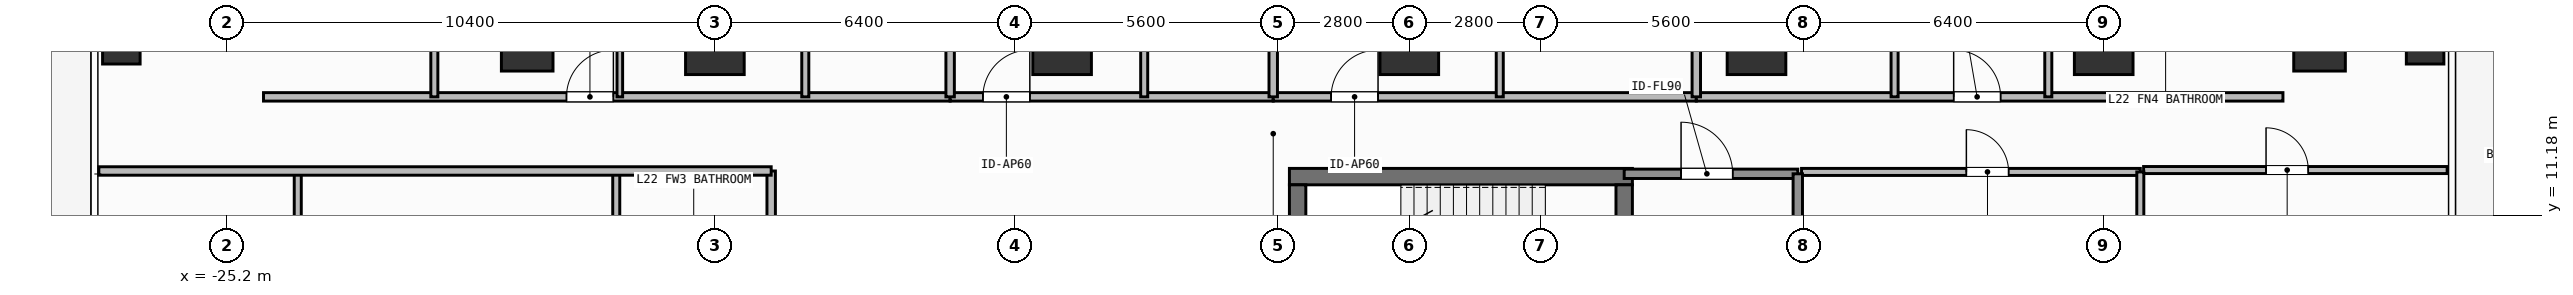
"""IFC4 building model, lengths in metres.
Left out: names, types, materials, properties, quantities, classifications, styles, units other than length and angle.
Written with IfcOpenShell. Run it as: python <this file> out.ifc"""

import sys

from ifc_helpers import new_model, si_unit, direction, frame, frame_2d, origin, origin_2d, place, context, subcontext, project, spatial, rectangle, hollow_rectangle, extrude, element, fill, save


model = new_model("IFC4")
c1 = context("Model", 3, precision=1e-05, world=origin(), true_north=direction((0.0, 1.0)))
c2 = subcontext(c1, "Body", "Model", "MODEL_VIEW")
j1 = project(units=[si_unit("LENGTHUNIT", "METRE"), si_unit("PLANEANGLEUNIT", "RADIAN")], contexts=[c1])
p1 = place(None, origin())
s1 = spatial("IfcSite", under=j1, at=p1, CompositionType="ELEMENT")
p2 = place(p1, origin())
s2 = spatial("IfcBuilding", under=s1, at=p2, CompositionType="ELEMENT")
p3 = place(p2, frame((0.0, 0.0, 89.1)))
s3 = spatial("IfcBuildingStorey", under=s2, at=p3, CompositionType="ELEMENT", Elevation=89.1)
p4 = place(p3, frame((-2.555, 12.0, 0.0), z_axis=(0.0, 0.0, 1.0), x_axis=(1.0, 0.0, 0.0)))
e1 = element("IfcWall", 1, at=p4, inside=s3, PredefinedType="SHEAR", context=c2, shape_type="SweptSolid", body=[
    extrude(rectangle(XDim=7.31, YDim=0.35, at=frame_2d((3.655, 0.0))), origin(), (0.0, 0.0, 1.0), 3.9),
])
p5 = place(p3, frame((-2.38, 8.9, 0.0), z_axis=(0.0, 0.0, 1.0), x_axis=(0.0, 1.0, 0.0)))
e2 = element("IfcWall", 2, at=p5, inside=s3, PredefinedType="SHEAR", context=c2, shape_type="SweptSolid", body=[
    extrude(rectangle(XDim=2.925, YDim=0.35, at=frame_2d((1.462, 0.0))), origin(), (0.0, 0.0, 1.0), 3.9),
])
p6 = place(p3, frame((4.58, 11.825, 0.0), z_axis=(0.0, 0.0, 1.0), x_axis=(0.0, -1.0, 0.0)))
e3 = element("IfcWall", 3, at=p6, inside=s3, PredefinedType="SHEAR", context=c2, shape_type="SweptSolid", body=[
    extrude(rectangle(XDim=2.925, YDim=0.35, at=frame_2d((1.462, 0.0))), origin(), (0.0, 0.0, 1.0), 3.9),
])
p7 = place(p6, frame((0.913, 0.0, 0.0)))
e4 = element("IfcOpeningElement", 4, at=p7, cuts=e3, PredefinedType="OPENING", context=c2, shape_type="SweptSolid", body=[
    extrude(rectangle(XDim=1.1, YDim=2.15, at=frame_2d((0.55, 1.075))), frame((0.0, 0.185, 0.0), z_axis=(0.0, -1.0, 0.0), x_axis=(1.0, 0.0, 0.0)), (0.0, 0.0, 1.0), 0.37),
])
for number, where, z_axis, x_axis in (
    (5, (-14.8, 14.8, 0.0), (0.0, 0.0, 1.0), (1.0, 0.0, 0.0)),
    (6, (-7.4, 14.8, 0.0), (0.0, 0.0, 1.0), (1.0, 0.0, 0.0)),
    (7, (0.0, 14.8, 0.0), (0.0, 0.0, 1.0), (1.0, 0.0, 0.0)),
    (8, (7.4, 14.8, 0.0), (0.0, 0.0, 1.0), (1.0, 0.0, 0.0)),
    (9, (14.8, 14.8, 0.0), (0.0, 0.0, 1.0), (1.0, 0.0, 0.0)),
):
    element("IfcColumn", number, at=place(p3, frame(where, z_axis=z_axis, x_axis=x_axis)), inside=s3, PredefinedType="COLUMN", context=c2, shape_type="SweptSolid", body=[
        extrude(rectangle(XDim=1.25, YDim=1.25, at=origin_2d()), origin(), (0.0, 0.0, 1.0), 3.9),
    ])
for number, where, z_axis, x_axis in (
    (10, (-18.8, 14.8, 0.0), (0.0, 0.0, 1.0), (1.0, 0.0, 0.0)),
    (11, (19.4, 14.8, 0.0), (0.0, 0.0, 1.0), (1.0, 0.0, 0.0)),
):
    element("IfcColumn", number, at=place(p3, frame(where, z_axis=z_axis, x_axis=x_axis)), inside=s3, PredefinedType="COLUMN", context=c2, shape_type="SweptSolid", body=[
        extrude(rectangle(XDim=1.1, YDim=1.1, at=origin_2d()), origin(), (0.0, 0.0, 1.0), 3.9),
    ])
for number, where, z_axis, x_axis in (
    (12, (-27.45, 14.8, 0.0), (0.0, 0.0, 1.0), (1.0, 0.0, 0.0)),
    (13, (21.65, 14.8, 0.0), (0.0, 0.0, 1.0), (1.0, 0.0, 0.0)),
):
    element("IfcColumn", number, at=place(p3, frame(where, z_axis=z_axis, x_axis=x_axis)), inside=s3, PredefinedType="COLUMN", context=c2, shape_type="SweptSolid", body=[
        extrude(hollow_rectangle(XDim=0.8, YDim=0.8, WallThickness=0.036, at=origin_2d()), origin(), (0.0, 0.0, 1.0), 3.9),
    ])
p8 = place(p3, frame((4.58, 12.06, 0.0), z_axis=(0.0, 0.0, 1.0), x_axis=(1.0, 0.0, 0.0)))
e14 = element("IfcWall", 14, at=p8, inside=s3, PredefinedType="SOLIDWALL", context=c2, shape_type="SweptSolid", body=[
    extrude(rectangle(XDim=3.7, YDim=0.2, at=frame_2d((1.85, 0.0))), origin(), (0.0, 0.0, 1.0), 3.68),
])
p9 = place(p8, frame((1.212, 0.0, 0.0)))
e15 = element("IfcOpeningElement", 15, at=p9, cuts=e14, PredefinedType="OPENING", context=c2, shape_type="SweptSolid", body=[
    extrude(rectangle(XDim=1.1, YDim=2.15, at=frame_2d((0.55, 1.075))), frame((0.0, 0.11, 0.0), z_axis=(0.0, -1.0, 0.0), x_axis=(1.0, 0.0, 0.0)), (0.0, 0.0, 1.0), 0.22),
])
p10 = place(p3, frame((8.36, 12.1, 0.0), z_axis=(0.0, 0.0, 1.0), x_axis=(1.0, 0.0, 0.0)))
e16 = element("IfcWall", 16, at=p10, inside=s3, PredefinedType="PARTITIONING", context=c2, shape_type="SweptSolid", body=[
    extrude(rectangle(XDim=7.22, YDim=0.15, at=frame_2d((3.61, 0.0))), origin(), (0.0, 0.0, 1.0), 3.68),
])
p11 = place(p10, frame((3.513, 0.0, 0.0)))
e17 = element("IfcOpeningElement", 17, at=p11, cuts=e16, PredefinedType="OPENING", context=c2, shape_type="SweptSolid", body=[
    extrude(rectangle(XDim=0.9, YDim=2.1, at=frame_2d((0.45, 1.05))), frame((0.0, 0.085, 0.0), z_axis=(0.0, -1.0, 0.0), x_axis=(1.0, 0.0, 0.0)), (0.0, 0.0, 1.0), 0.17),
])
p12 = place(p3, frame((-24.42, 13.7, 0.0), z_axis=(0.0, 0.0, 1.0), x_axis=(1.0, 0.0, 0.0)))
e18 = element("IfcWall", 18, at=p12, inside=s3, PredefinedType="PARTITIONING", context=c2, shape_type="SweptSolid", body=[
    extrude(rectangle(XDim=14.634, YDim=0.18, at=frame_2d((7.317, 0.0))), origin(), (0.0, 0.0, 1.0), 3.68),
])
p13 = place(p12, frame((6.457, 0.0, 0.0)))
e19 = element("IfcOpeningElement", 19, at=p13, cuts=e18, PredefinedType="OPENING", context=c2, shape_type="SweptSolid", body=[
    extrude(rectangle(XDim=1.0, YDim=2.2, at=frame_2d((0.5, 1.1))), frame((0.0, 0.1, 0.0), z_axis=(0.0, -1.0, 0.0), x_axis=(1.0, 0.0, 0.0)), (0.0, 0.0, 1.0), 0.2),
])
p14 = place(p3, frame((-16.826, 13.7, 0.0), z_axis=(0.0, 0.0, 1.0), x_axis=(0.0, 1.0, 0.0)))
e20 = element("IfcWall", 20, at=p14, inside=s3, PredefinedType="PARTITIONING", context=c2, shape_type="SweptSolid", body=[
    extrude(rectangle(XDim=12.89, YDim=0.12, at=frame_2d((6.445, 0.0))), origin(), (0.0, 0.0, 1.0), 3.68),
])
p15 = place(p14, frame((5.008, 0.0, 0.0)))
e21 = element("IfcOpeningElement", 21, at=p15, cuts=e20, PredefinedType="OPENING", context=c2, shape_type="SweptSolid", body=[
    extrude(rectangle(XDim=0.9, YDim=2.1, at=frame_2d((0.45, 1.05))), frame((0.0, 0.07, 0.0), z_axis=(0.0, -1.0, 0.0), x_axis=(1.0, 0.0, 0.0)), (0.0, 0.0, 1.0), 0.14),
])
p16 = place(p3, frame((-20.779, 13.7, 0.0), z_axis=(0.0, 0.0, 1.0), x_axis=(0.0, 1.0, 0.0)))
e22 = element("IfcWall", 22, at=p16, inside=s3, PredefinedType="PARTITIONING", context=c2, shape_type="SweptSolid", body=[
    extrude(rectangle(XDim=7.476, YDim=0.15, at=frame_2d((3.738, 0.0))), origin(), (0.0, 0.0, 1.0), 3.68),
])
p17 = place(p16, frame((3.313, 0.0, 0.0)))
e23 = element("IfcOpeningElement", 23, at=p17, cuts=e22, PredefinedType="OPENING", context=c2, shape_type="SweptSolid", body=[
    extrude(rectangle(XDim=0.85, YDim=2.1, at=frame_2d((0.425, 1.05))), frame((0.0, 0.085, 0.0), z_axis=(0.0, -1.0, 0.0), x_axis=(1.0, 0.0, 0.0)), (0.0, 0.0, 1.0), 0.17),
])
p18 = place(p3, frame((-12.873, 13.7, 0.0), z_axis=(0.0, 0.0, 1.0), x_axis=(0.0, 1.0, 0.0)))
e24 = element("IfcWall", 24, at=p18, inside=s3, PredefinedType="PARTITIONING", context=c2, shape_type="SweptSolid", body=[
    extrude(rectangle(XDim=9.023, YDim=0.15, at=frame_2d((4.511, 0.0))), origin(), (0.0, 0.0, 1.0), 3.68),
])
p19 = place(p18, frame((4.086, 0.0, 0.0)))
e25 = element("IfcOpeningElement", 25, at=p19, cuts=e24, PredefinedType="OPENING", context=c2, shape_type="SweptSolid", body=[
    extrude(rectangle(XDim=0.85, YDim=2.1, at=frame_2d((0.425, 1.05))), frame((0.0, 0.085, 0.0), z_axis=(0.0, -1.0, 0.0), x_axis=(1.0, 0.0, 0.0)), (0.0, 0.0, 1.0), 0.17),
])
p20 = place(p3, frame((-9.786, 13.7, 0.0), z_axis=(0.0, 0.0, 1.0), x_axis=(1.0, 0.0, 0.0)))
e26 = element("IfcWall", 26, at=p20, inside=s3, PredefinedType="PARTITIONING", context=c2, shape_type="SweptSolid", body=[
    extrude(rectangle(XDim=6.886, YDim=0.18, at=frame_2d((3.443, 0.0))), origin(), (0.0, 0.0, 1.0), 3.68),
])
p21 = place(p20, frame((0.698, 0.0, 0.0)))
e27 = element("IfcOpeningElement", 27, at=p21, cuts=e26, PredefinedType="OPENING", context=c2, shape_type="SweptSolid", body=[
    extrude(rectangle(XDim=1.0, YDim=2.2, at=frame_2d((0.5, 1.1))), frame((0.0, 0.1, 0.0), z_axis=(0.0, -1.0, 0.0), x_axis=(1.0, 0.0, 0.0)), (0.0, 0.0, 1.0), 0.2),
])
p22 = place(p3, frame((-5.65, 13.7, 0.0), z_axis=(0.0, 0.0, 1.0), x_axis=(0.0, 1.0, 0.0)))
e28 = element("IfcWall", 28, at=p22, inside=s3, PredefinedType="PARTITIONING", context=c2, shape_type="SweptSolid", body=[
    extrude(rectangle(XDim=7.09, YDim=0.15, at=frame_2d((3.545, 0.0))), origin(), (0.0, 0.0, 1.0), 3.68),
])
p23 = place(p22, frame((3.03, 0.0, 0.0)))
e29 = element("IfcOpeningElement", 29, at=p23, cuts=e28, PredefinedType="OPENING", context=c2, shape_type="SweptSolid", body=[
    extrude(rectangle(XDim=0.85, YDim=2.1, at=frame_2d((0.425, 1.05))), frame((0.0, 0.085, 0.0), z_axis=(0.0, -1.0, 0.0), x_axis=(1.0, 0.0, 0.0)), (0.0, 0.0, 1.0), 0.17),
])
p24 = place(p3, frame((-2.9, 13.7, 0.0), z_axis=(0.0, 0.0, 1.0), x_axis=(1.0, 0.0, 0.0)))
e30 = element("IfcWall", 30, at=p24, inside=s3, PredefinedType="PARTITIONING", context=c2, shape_type="SweptSolid", body=[
    extrude(rectangle(XDim=9.017, YDim=0.18, at=frame_2d((4.508, 0.0))), origin(), (0.0, 0.0, 1.0), 3.68),
])
p25 = place(p24, frame((1.234, 0.0, 0.0)))
e31 = element("IfcOpeningElement", 31, at=p25, cuts=e30, PredefinedType="OPENING", context=c2, shape_type="SweptSolid", body=[
    extrude(rectangle(XDim=1.0, YDim=2.2, at=frame_2d((0.5, 1.1))), frame((0.0, 0.1, 0.0), z_axis=(0.0, -1.0, 0.0), x_axis=(1.0, 0.0, 0.0)), (0.0, 0.0, 1.0), 0.2),
])
p26 = place(p3, frame((1.928, 13.7, 0.0), z_axis=(0.0, 0.0, 1.0), x_axis=(0.0, 1.0, 0.0)))
e32 = element("IfcWall", 32, at=p26, inside=s3, PredefinedType="PARTITIONING", context=c2, shape_type="SweptSolid", body=[
    extrude(rectangle(XDim=8.474, YDim=0.15, at=frame_2d((4.237, 0.0))), origin(), (0.0, 0.0, 1.0), 3.68),
])
p27 = place(p26, frame((3.723, 0.0, 0.0)))
e33 = element("IfcOpeningElement", 33, at=p27, cuts=e32, PredefinedType="OPENING", context=c2, shape_type="SweptSolid", body=[
    extrude(rectangle(XDim=0.85, YDim=2.1, at=frame_2d((0.425, 1.05))), frame((0.0, 0.085, 0.0), z_axis=(0.0, -1.0, 0.0), x_axis=(1.0, 0.0, 0.0)), (0.0, 0.0, 1.0), 0.17),
])
p28 = place(p3, frame((6.117, 13.7, 0.0), z_axis=(0.0, 0.0, 1.0), x_axis=(1.0, 0.0, 0.0)))
e34 = element("IfcWall", 34, at=p28, inside=s3, PredefinedType="PARTITIONING", context=c2, shape_type="SweptSolid", body=[
    extrude(rectangle(XDim=12.503, YDim=0.18, at=frame_2d((6.251, 0.0))), origin(), (0.0, 0.0, 1.0), 3.68),
])
p29 = place(p28, frame((5.485, 0.0, 0.0)))
e35 = element("IfcOpeningElement", 35, at=p29, cuts=e34, PredefinedType="OPENING", context=c2, shape_type="SweptSolid", body=[
    extrude(rectangle(XDim=1.0, YDim=2.2, at=frame_2d((0.5, 1.1))), frame((0.0, 0.1, 0.0), z_axis=(0.0, -1.0, 0.0), x_axis=(1.0, 0.0, 0.0)), (0.0, 0.0, 1.0), 0.2),
])
p30 = place(p3, frame((10.343, 13.7, 0.0), z_axis=(0.0, 0.0, 1.0), x_axis=(0.0, 1.0, 0.0)))
e36 = element("IfcWall", 36, at=p30, inside=s3, PredefinedType="PARTITIONING", context=c2, shape_type="SweptSolid", body=[
    extrude(rectangle(XDim=8.045, YDim=0.15, at=frame_2d((4.022, 0.0))), origin(), (0.0, 0.0, 1.0), 3.68),
])
p31 = place(p30, frame((3.51, 0.0, 0.0)))
e37 = element("IfcOpeningElement", 37, at=p31, cuts=e36, PredefinedType="OPENING", context=c2, shape_type="SweptSolid", body=[
    extrude(rectangle(XDim=0.85, YDim=2.1, at=frame_2d((0.425, 1.05))), frame((0.0, 0.085, 0.0), z_axis=(0.0, -1.0, 0.0), x_axis=(1.0, 0.0, 0.0)), (0.0, 0.0, 1.0), 0.17),
])
p32 = place(p3, frame((13.619, 13.7, 0.0), z_axis=(0.0, 0.0, 1.0), x_axis=(0.0, 1.0, 0.0)))
e38 = element("IfcWall", 38, at=p32, inside=s3, PredefinedType="PARTITIONING", context=c2, shape_type="SweptSolid", body=[
    extrude(rectangle(XDim=3.48, YDim=0.15, at=frame_2d((1.74, 0.0))), origin(), (0.0, 0.0, 1.0), 3.68),
])
p33 = place(p32, frame((1.937, 0.0, 0.0)))
e39 = element("IfcOpeningElement", 39, at=p33, cuts=e38, PredefinedType="OPENING", context=c2, shape_type="SweptSolid", body=[
    extrude(rectangle(XDim=0.85, YDim=2.1, at=frame_2d((0.425, 1.05))), frame((0.0, 0.085, 0.0), z_axis=(0.0, -1.0, 0.0), x_axis=(1.0, 0.0, 0.0)), (0.0, 0.0, 1.0), 0.17),
])
p34 = place(p3, frame((-13.6, 4.04, 0.0), z_axis=(0.0, 0.0, 1.0), x_axis=(0.0, 1.0, 0.0)))
e40 = element("IfcWall", 40, at=p34, inside=s3, PredefinedType="PARTITIONING", context=c2, shape_type="SweptSolid", body=[
    extrude(rectangle(XDim=8.08, YDim=0.18, at=frame_2d((4.04, 0.0))), origin(), (0.0, 0.0, 1.0), 3.68),
])
p35 = place(p34, frame((1.583, 0.0, 0.0)))
e41 = element("IfcOpeningElement", 41, at=p35, cuts=e40, PredefinedType="OPENING", context=c2, shape_type="SweptSolid", body=[
    extrude(rectangle(XDim=1.0, YDim=2.2, at=frame_2d((0.5, 1.1))), frame((0.0, 0.1, 0.0), z_axis=(0.0, -1.0, 0.0), x_axis=(1.0, 0.0, 0.0)), (0.0, 0.0, 1.0), 0.2),
])
p36 = place(p3, frame((15.65, 12.14, 0.0), z_axis=(0.0, 0.0, 1.0), x_axis=(1.0, 0.0, 0.0)))
e42 = element("IfcWall", 42, at=p36, inside=s3, PredefinedType="PARTITIONING", context=c2, shape_type="SweptSolid", body=[
    extrude(rectangle(XDim=6.47, YDim=0.15, at=frame_2d((3.235, 0.0))), origin(), (0.0, 0.0, 1.0), 3.68),
])
p37 = place(p36, frame((2.61, 0.0, 0.0)))
e43 = element("IfcOpeningElement", 43, at=p37, cuts=e42, PredefinedType="OPENING", context=c2, shape_type="SweptSolid", body=[
    extrude(rectangle(XDim=0.9, YDim=2.1, at=frame_2d((0.45, 1.05))), frame((0.0, 0.085, 0.0), z_axis=(0.0, -1.0, 0.0), x_axis=(1.0, 0.0, 0.0)), (0.0, 0.0, 1.0), 0.17),
])
p38 = place(p3, frame((8.28, 8.875, 0.0), z_axis=(0.0, 0.0, 1.0), x_axis=(0.0, 1.0, 0.0)))
e44 = element("IfcWall", 44, at=p38, inside=s3, PredefinedType="SOLIDWALL", context=c2, shape_type="SweptSolid", body=[
    extrude(rectangle(XDim=3.185, YDim=0.2, at=frame_2d((1.593, 0.0))), origin(), (0.0, 0.0, 1.0), 3.68),
])
p39 = place(p3, frame((15.58, 5.85, 0.0), z_axis=(0.0, 0.0, 1.0), x_axis=(0.0, 1.0, 0.0)))
e45 = element("IfcWall", 45, at=p39, inside=s3, PredefinedType="PARTITIONING", context=c2, shape_type="SweptSolid", body=[
    extrude(rectangle(XDim=6.25, YDim=0.15, at=frame_2d((3.125, 0.0))), origin(), (0.0, 0.0, 1.0), 3.68),
])
for number, where, z_axis, x_axis in (
    (46, (-9.786, 13.7, 0.0), (0.0, 0.0, 1.0), (0.0, 1.0, 0.0)),
    (47, (-2.9, 13.7, 0.0), (0.0, 0.0, 1.0), (0.0, 1.0, 0.0)),
    (48, (6.117, 13.7, 0.0), (0.0, 0.0, 1.0), (0.0, 1.0, 0.0)),
):
    element("IfcWall", number, at=place(p3, frame(where, z_axis=z_axis, x_axis=x_axis)), inside=s3, PredefinedType="PARTITIONING", context=c2, shape_type="SweptSolid", body=[
        extrude(rectangle(XDim=17.13, YDim=0.18, at=frame_2d((8.565, 0.0))), origin(), (0.0, 0.0, 1.0), 3.68),
    ])
for number, where, z_axis, x_axis in (
    (49, (-16.902, 9.32, 0.0), (0.0, 0.0, 1.0), (0.0, 1.0, 0.0)),
    (50, (-23.69, 9.32, 0.0), (0.0, 0.0, 1.0), (0.0, 1.0, 0.0)),
):
    element("IfcWall", number, at=place(p3, frame(where, z_axis=z_axis, x_axis=x_axis)), inside=s3, PredefinedType="PARTITIONING", context=c2, shape_type="SweptSolid", body=[
        extrude(rectangle(XDim=2.8, YDim=0.15, at=frame_2d((1.4, 0.0))), origin(), (0.0, 0.0, 1.0), 3.68),
    ])
p40 = place(p3, frame((-27.93, 12.12, 0.0), z_axis=(0.0, 0.0, 1.0), x_axis=(1.0, 0.0, 0.0)))
e51 = element("IfcWall", 51, at=p40, inside=s3, PredefinedType="PARTITIONING", context=c2, shape_type="SweptSolid", body=[
    extrude(rectangle(XDim=14.33, YDim=0.18, at=frame_2d((7.165, 0.0))), origin(), (0.0, 0.0, 1.0), 3.68),
])
p41 = place(p9, origin())
e52 = element("IfcDoor", 52, at=p41, inside=s3, OperationType="SINGLE_SWING_LEFT", PredefinedType="DOOR", context=c2, shape_type="SweptSolid", body=[
    extrude(rectangle(XDim=1.1, YDim=2.15, at=frame_2d((0.55, 1.075))), frame((0.0, 0.025, 0.0), z_axis=(0.0, -1.0, 0.0), x_axis=(1.0, 0.0, 0.0)), (0.0, 0.0, 1.0), 0.05),
])
fill(e15, e52)
p42 = place(p11, origin())
e53 = element("IfcDoor", 53, at=p42, inside=s3, OperationType="SINGLE_SWING_LEFT", PredefinedType="DOOR", context=c2, shape_type="SweptSolid", body=[
    extrude(rectangle(XDim=0.9, YDim=2.1, at=frame_2d((0.45, 1.05))), frame((0.0, 0.025, 0.0), z_axis=(0.0, -1.0, 0.0), x_axis=(1.0, 0.0, 0.0)), (0.0, 0.0, 1.0), 0.05),
])
fill(e17, e53)
p43 = place(p13, origin())
e54 = element("IfcDoor", 54, at=p43, inside=s3, OperationType="SINGLE_SWING_RIGHT", PredefinedType="DOOR", context=c2, shape_type="SweptSolid", body=[
    extrude(rectangle(XDim=1.0, YDim=2.2, at=frame_2d((0.5, 1.1))), frame((0.0, 0.025, 0.0), z_axis=(0.0, -1.0, 0.0), x_axis=(1.0, 0.0, 0.0)), (0.0, 0.0, 1.0), 0.05),
])
fill(e19, e54)
p44 = place(p21, origin())
e55 = element("IfcDoor", 55, at=p44, inside=s3, OperationType="SINGLE_SWING_RIGHT", PredefinedType="DOOR", context=c2, shape_type="SweptSolid", body=[
    extrude(rectangle(XDim=1.0, YDim=2.2, at=frame_2d((0.5, 1.1))), frame((0.0, 0.025, 0.0), z_axis=(0.0, -1.0, 0.0), x_axis=(1.0, 0.0, 0.0)), (0.0, 0.0, 1.0), 0.05),
])
fill(e27, e55)
p45 = place(p25, origin())
e56 = element("IfcDoor", 56, at=p45, inside=s3, OperationType="SINGLE_SWING_RIGHT", PredefinedType="DOOR", context=c2, shape_type="SweptSolid", body=[
    extrude(rectangle(XDim=1.0, YDim=2.2, at=frame_2d((0.5, 1.1))), frame((0.0, 0.025, 0.0), z_axis=(0.0, -1.0, 0.0), x_axis=(1.0, 0.0, 0.0)), (0.0, 0.0, 1.0), 0.05),
])
fill(e31, e56)
p46 = place(p29, origin())
e57 = element("IfcDoor", 57, at=p46, inside=s3, OperationType="SINGLE_SWING_LEFT", PredefinedType="DOOR", context=c2, shape_type="SweptSolid", body=[
    extrude(rectangle(XDim=1.0, YDim=2.2, at=frame_2d((0.5, 1.1))), frame((0.0, 0.025, 0.0), z_axis=(0.0, -1.0, 0.0), x_axis=(1.0, 0.0, 0.0)), (0.0, 0.0, 1.0), 0.05),
])
fill(e35, e57)
p47 = place(p37, origin())
e58 = element("IfcDoor", 58, at=p47, inside=s3, OperationType="SINGLE_SWING_LEFT", PredefinedType="DOOR", context=c2, shape_type="SweptSolid", body=[
    extrude(rectangle(XDim=0.9, YDim=2.1, at=frame_2d((0.45, 1.05))), frame((0.0, 0.025, 0.0), z_axis=(0.0, -1.0, 0.0), x_axis=(1.0, 0.0, 0.0)), (0.0, 0.0, 1.0), 0.05),
])
fill(e43, e58)
save(model, sys.argv[1])
